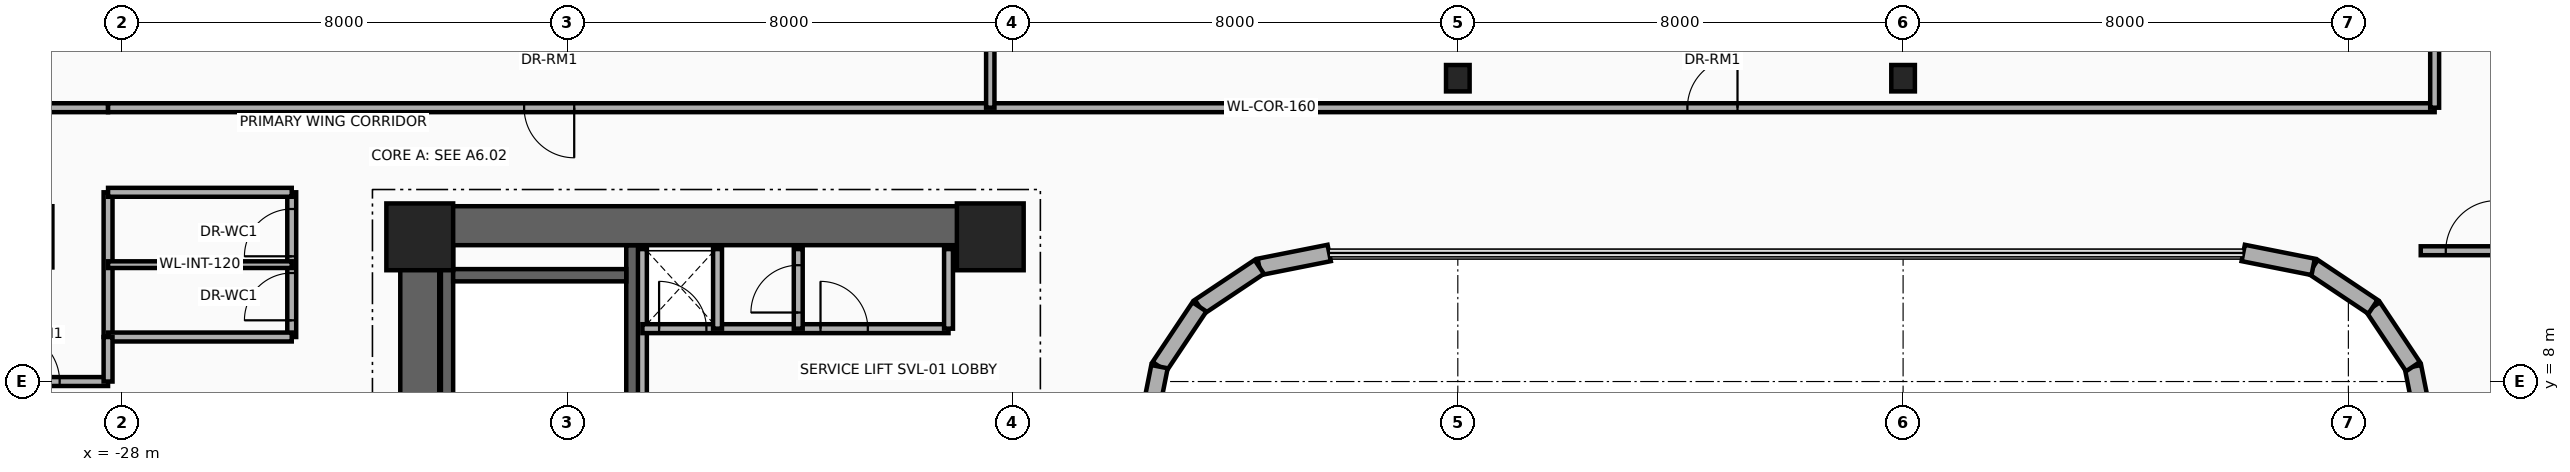
"""IFC4 building model, lengths in metres.
Left out: names, types, materials, properties, quantities, classifications, styles, units other than length and angle.
Written with IfcOpenShell. Run it as: python <this file> out.ifc"""

import sys

from ifc_helpers import new_model, si_unit, direction, frame, frame_2d, origin, origin_2d, place, context, subcontext, project, spatial, rectangle, i_section, extrude, source, transform, mapped, element, fill, save


model = new_model("IFC4")
c1 = context("Model", 3, precision=1e-05, world=origin(), true_north=direction((0.0, 1.0)))
c2 = subcontext(c1, "Body", "Model", "MODEL_VIEW")
j1 = project(units=[si_unit("LENGTHUNIT", "METRE"), si_unit("PLANEANGLEUNIT", "RADIAN")], contexts=[c1])
p1 = place(None, origin())
s1 = spatial("IfcSite", under=j1, at=p1, CompositionType="ELEMENT")
p2 = place(p1, origin())
s2 = spatial("IfcBuilding", under=s1, at=p2, CompositionType="ELEMENT")
p3 = place(p2, frame((0.0, 0.0, 120.5)))
s3 = spatial("IfcBuildingStorey", under=s2, at=p3, CompositionType="ELEMENT", Elevation=120.5)
for number, where, z_axis, x_axis in (
    (1, (-22.16, 1.78, 0.0), (0.0, 0.0, 1.0), (0.0, 1.0, 0.0)),
    (2, (-18.83, 1.78, 0.0), (0.0, 0.0, 1.0), (0.0, 1.0, 0.0)),
):
    element("IfcWall", number, at=place(p3, frame(where, z_axis=z_axis, x_axis=x_axis)), inside=s3, PredefinedType="SHEAR", context=c2, shape_type="SweptSolid", body=[
        extrude(rectangle(XDim=8.67, YDim=0.22, at=frame_2d((4.335, 0.0))), origin(), (0.0, 0.0, 1.0), 3.46),
    ])
p4 = place(p3, frame((-22.05, 9.91, 0.0), z_axis=(0.0, 0.0, 1.0), x_axis=(1.0, 0.0, 0.0)))
e3 = element("IfcWall", 3, at=p4, inside=s3, PredefinedType="SHEAR", context=c2, shape_type="SweptSolid", body=[
    extrude(rectangle(XDim=3.11, YDim=0.22, at=frame_2d((1.555, 0.0))), origin(), (0.0, 0.0, 1.0), 3.46),
])
p5 = place(p3, frame((-22.65, -11.15, 0.0), z_axis=(0.0, 0.0, 1.0), x_axis=(0.0, 1.0, 0.0)))
e4 = element("IfcWall", 4, at=p5, inside=s3, PredefinedType="SHEAR", context=c2, shape_type="SweptSolid", body=[
    extrude(rectangle(XDim=22.3, YDim=0.7, at=frame_2d((11.15, 0.0))), origin(), (0.0, 0.0, 1.0), 3.46),
])
p6 = place(p3, frame((-22.65, 10.8, 0.0), z_axis=(0.0, 0.0, 1.0), x_axis=(1.0, 0.0, 0.0)))
e5 = element("IfcWall", 5, at=p6, inside=s3, PredefinedType="SHEAR", context=c2, shape_type="SweptSolid", body=[
    extrude(rectangle(XDim=10.25, YDim=0.7, at=frame_2d((5.125, 0.0))), origin(), (0.0, 0.0, 1.0), 3.46),
])
m1 = source(origin(), c2, "Body", "SweptSolid", [
    extrude(rectangle(XDim=1.2, YDim=1.2, at=origin_2d()), origin(), (0.0, 0.0, 1.0), 3.7),
])
for number, where, z_axis, x_axis in (
    (6, (-22.65, 10.6, 0.0), (0.0, 0.0, 1.0), (1.0, 0.0, 0.0)),
    (7, (-12.4, 10.6, 0.0), (0.0, 0.0, 1.0), (1.0, 0.0, 0.0)),
):
    element("IfcColumn", number, at=place(p3, frame(where, z_axis=z_axis, x_axis=x_axis)), inside=s3, PredefinedType="COLUMN", context=c2, shape_type="MappedRepresentation", body=[
        mapped(m1, transform((0.0, 0.0, 0.0), x_axis=(1.0, 0.0, 0.0), y_axis=(0.0, 1.0, 0.0), z_axis=(0.0, 0.0, 1.0), scale=1.0)),
    ])
m2 = source(origin(), c2, "Body", "SweptSolid", [
    extrude(i_section(OverallWidth=0.424, OverallDepth=0.474, WebThickness=0.048, FlangeThickness=0.077, at=origin_2d()), origin(), (0.0, 0.0, 1.0), 3.7),
])
for number, where, z_axis, x_axis in (
    (8, (-4.0, 13.45, 0.0), (0.0, 0.0, 1.0), (1.0, 0.0, 0.0)),
    (9, (4.0, 13.45, 0.0), (0.0, 0.0, 1.0), (1.0, 0.0, 0.0)),
):
    element("IfcColumn", number, at=place(p3, frame(where, z_axis=z_axis, x_axis=x_axis)), inside=s3, PredefinedType="COLUMN", context=c2, shape_type="MappedRepresentation", body=[
        mapped(m2, transform((0.0, 0.0, 0.0), x_axis=(1.0, 0.0, 0.0), y_axis=(0.0, 1.0, 0.0), z_axis=(0.0, 0.0, 1.0), scale=1.0)),
    ])
p7 = place(p3, frame((13.41, 7.011, 0.0), z_axis=(0.0, 0.0, 1.0), x_axis=(-0.195090163074, 0.980785312019, 0.0)))
e10 = element("IfcWall", 10, at=p7, inside=s3, PredefinedType="SOLIDWALL", context=c2, shape_type="SweptSolid", body=[
    extrude(rectangle(XDim=1.281, YDim=0.3, at=frame_2d((0.641, 0.0))), origin(), (0.0, 0.0, 1.0), 3.46),
])
for number, where, z_axis, x_axis in (
    (11, (13.16, 8.268, 0.0), (0.0, 0.0, 1.0), (-0.556, 0.831, 0.0)),
    (12, (12.442, 9.342, 0.0), (0.0, 0.0, 1.0), (-0.831, 0.556, 0.0)),
):
    element("IfcWall", number, at=place(p3, frame(where, z_axis=z_axis, x_axis=x_axis)), inside=s3, PredefinedType="SOLIDWALL", context=c2, shape_type="SweptSolid", body=[
        extrude(rectangle(XDim=1.292, YDim=0.3, at=frame_2d((0.646, 0.0))), origin(), (0.0, 0.0, 1.0), 3.46),
    ])
for number, where, z_axis, x_axis in (
    (13, (11.367, 10.06, 0.0), (0.0, 0.0, 1.0), (-0.981, 0.195, 0.0)),
    (14, (-6.311, 10.31, 0.0), (0.0, 0.0, 1.0), (-0.981, -0.195, 0.0)),
):
    element("IfcWall", number, at=place(p3, frame(where, z_axis=z_axis, x_axis=x_axis)), inside=s3, PredefinedType="SOLIDWALL", context=c2, shape_type="SweptSolid", body=[
        extrude(rectangle(XDim=1.281, YDim=0.3, at=frame_2d((0.641, 0.0))), origin(), (0.0, 0.0, 1.0), 3.46),
    ])
p8 = place(p3, frame((-7.567, 10.06, 0.0), z_axis=(0.0, 0.0, 1.0), x_axis=(-0.831497739511, -0.555528135371, 0.0)))
e15 = element("IfcWall", 15, at=p8, inside=s3, PredefinedType="SOLIDWALL", context=c2, shape_type="SweptSolid", body=[
    extrude(rectangle(XDim=1.292, YDim=0.3, at=frame_2d((0.646, 0.0))), origin(), (0.0, 0.0, 1.0), 3.46),
])
p9 = place(p3, frame((-8.642, 9.342, 0.0), z_axis=(0.0, 0.0, 1.0), x_axis=(-0.555615398575, -0.831439431869, 0.0)))
e16 = element("IfcWall", 16, at=p9, inside=s3, PredefinedType="SOLIDWALL", context=c2, shape_type="SweptSolid", body=[
    extrude(rectangle(XDim=1.292, YDim=0.3, at=frame_2d((0.646, 0.0))), origin(), (0.0, 0.0, 1.0), 3.46),
])
p10 = place(p3, frame((-9.36, 8.268, 0.0), z_axis=(0.0, 0.0, 1.0), x_axis=(-0.195090163074, -0.980785312019, 0.0)))
e17 = element("IfcWall", 17, at=p10, inside=s3, PredefinedType="SOLIDWALL", context=c2, shape_type="SweptSolid", body=[
    extrude(rectangle(XDim=1.281, YDim=0.3, at=frame_2d((0.641, 0.0))), origin(), (0.0, 0.0, 1.0), 3.46),
])
p11 = place(p3, frame((-18.65, 7.45, 0.0), z_axis=(0.0, 0.0, 1.0), x_axis=(0.0, 1.0, 0.0)))
e18 = element("IfcWall", 18, at=p11, inside=s3, PredefinedType="PARTITIONING", context=c2, shape_type="SweptSolid", body=[
    extrude(rectangle(XDim=2.93, YDim=0.16, at=frame_2d((1.465, 0.0))), origin(), (0.0, 0.0, 1.0), 3.46),
])
p12 = place(p3, frame((-18.65, 8.95, 0.0), z_axis=(0.0, 0.0, 1.0), x_axis=(1.0, 0.0, 0.0)))
e19 = element("IfcWall", 19, at=p12, inside=s3, PredefinedType="PARTITIONING", context=c2, shape_type="SweptSolid", body=[
    extrude(rectangle(XDim=5.5, YDim=0.16, at=frame_2d((2.75, 0.0))), origin(), (0.0, 0.0, 1.0), 3.46),
])
p13 = place(p12, frame((0.3, 0.0, 0.0)))
e20 = element("IfcOpeningElement", 20, at=p13, cuts=e19, PredefinedType="OPENING", context=c2, shape_type="SweptSolid", body=[
    extrude(rectangle(XDim=0.85, YDim=2.05, at=frame_2d((0.425, 1.025))), frame((0.0, 0.095, 0.0), z_axis=(0.0, -1.0, 0.0), x_axis=(1.0, 0.0, 0.0)), (0.0, 0.0, 1.0), 0.19),
])
p14 = place(p12, frame((3.2, 0.0, 0.0)))
e21 = element("IfcOpeningElement", 21, at=p14, cuts=e19, PredefinedType="OPENING", context=c2, shape_type="SweptSolid", body=[
    extrude(rectangle(XDim=0.85, YDim=2.05, at=frame_2d((0.425, 1.025))), frame((0.0, 0.095, 0.0), z_axis=(0.0, -1.0, 0.0), x_axis=(1.0, 0.0, 0.0)), (0.0, 0.0, 1.0), 0.19),
])
for number, where, z_axis, x_axis in (
    (22, (-13.15, 8.95, 0.0), (0.0, 0.0, 1.0), (0.0, 1.0, 0.0)),
    (23, (-17.3, 8.95, 0.0), (0.0, 0.0, 1.0), (0.0, 1.0, 0.0)),
):
    element("IfcWall", number, at=place(p3, frame(where, z_axis=z_axis, x_axis=x_axis)), inside=s3, PredefinedType="PARTITIONING", context=c2, shape_type="SweptSolid", body=[
        extrude(rectangle(XDim=1.43, YDim=0.16, at=frame_2d((0.715, 0.0))), origin(), (0.0, 0.0, 1.0), 3.46),
    ])
p15 = place(p3, frame((-15.85, 8.95, 0.0), z_axis=(0.0, 0.0, 1.0), x_axis=(0.0, 1.0, 0.0)))
e24 = element("IfcWall", 24, at=p15, inside=s3, PredefinedType="PARTITIONING", context=c2, shape_type="SweptSolid", body=[
    extrude(rectangle(XDim=1.43, YDim=0.16, at=frame_2d((0.715, 0.0))), origin(), (0.0, 0.0, 1.0), 3.46),
])
p16 = place(p15, frame((0.29, 0.0, 0.0)))
e25 = element("IfcOpeningElement", 25, at=p16, cuts=e24, PredefinedType="OPENING", context=c2, shape_type="SweptSolid", body=[
    extrude(rectangle(XDim=0.85, YDim=2.05, at=frame_2d((0.425, 1.025))), frame((0.0, 0.095, 0.0), z_axis=(0.0, -1.0, 0.0), x_axis=(1.0, 0.0, 0.0)), (0.0, 0.0, 1.0), 0.19),
])
p17 = place(p3, frame((-28.25, 8.8, 0.0), z_axis=(0.0, 0.0, 1.0), x_axis=(0.0, 1.0, 0.0)))
e26 = element("IfcWall", 26, at=p17, inside=s3, PredefinedType="PARTITIONING", context=c2, shape_type="SweptSolid", body=[
    extrude(rectangle(XDim=2.6, YDim=0.16, at=frame_2d((1.3, 0.0))), origin(), (0.0, 0.0, 1.0), 2.666),
])
p18 = place(p3, frame((-24.95, 8.8, 0.0), z_axis=(0.0, 0.0, 1.0), x_axis=(0.0, 1.0, 0.0)))
e27 = element("IfcWall", 27, at=p18, inside=s3, PredefinedType="PARTITIONING", context=c2, shape_type="SweptSolid", body=[
    extrude(rectangle(XDim=2.6, YDim=0.16, at=frame_2d((1.3, 0.0))), origin(), (0.0, 0.0, 1.0), 2.666),
])
p19 = place(p18, frame((0.3, 0.0, 0.0)))
e28 = element("IfcOpeningElement", 28, at=p19, cuts=e27, PredefinedType="OPENING", context=c2, shape_type="SweptSolid", body=[
    extrude(rectangle(XDim=0.85, YDim=2.1, at=frame_2d((0.425, 1.05))), frame((0.0, 0.095, 0.0), z_axis=(0.0, -1.0, 0.0), x_axis=(1.0, 0.0, 0.0)), (0.0, 0.0, 1.0), 0.19),
])
p20 = place(p18, frame((1.45, 0.0, 0.0)))
e29 = element("IfcOpeningElement", 29, at=p20, cuts=e27, PredefinedType="OPENING", context=c2, shape_type="SweptSolid", body=[
    extrude(rectangle(XDim=0.85, YDim=2.1, at=frame_2d((0.425, 1.05))), frame((0.0, 0.095, 0.0), z_axis=(0.0, -1.0, 0.0), x_axis=(1.0, 0.0, 0.0)), (0.0, 0.0, 1.0), 0.19),
])
for number, where, z_axis, x_axis in (
    (30, (-28.25, 8.8, 0.0), (0.0, 0.0, 1.0), (1.0, 0.0, 0.0)),
    (31, (-28.25, 11.4, 0.0), (0.0, 0.0, 1.0), (1.0, 0.0, 0.0)),
):
    element("IfcWall", number, at=place(p3, frame(where, z_axis=z_axis, x_axis=x_axis)), inside=s3, PredefinedType="PARTITIONING", context=c2, shape_type="SweptSolid", body=[
        extrude(rectangle(XDim=3.3, YDim=0.16, at=frame_2d((1.65, 0.0))), origin(), (0.0, 0.0, 1.0), 3.46),
    ])
p21 = place(p3, frame((-28.25, 10.1, 0.0), z_axis=(0.0, 0.0, 1.0), x_axis=(1.0, 0.0, 0.0)))
e32 = element("IfcWall", 32, at=p21, inside=s3, PredefinedType="PARTITIONING", context=c2, shape_type="SweptSolid", body=[
    extrude(rectangle(XDim=3.3, YDim=0.12, at=frame_2d((1.65, 0.0))), origin(), (0.0, 0.0, 1.0), 3.46),
])
p22 = place(p3, frame((-30.89, 8.0, 0.0), z_axis=(0.0, 0.0, 1.0), x_axis=(1.0, 0.0, 0.0)))
e33 = element("IfcWall", 33, at=p22, inside=s3, PredefinedType="PARTITIONING", context=c2, shape_type="SweptSolid", body=[
    extrude(rectangle(XDim=2.64, YDim=0.16, at=frame_2d((1.32, 0.0))), origin(), (0.0, 0.0, 1.0), 2.896),
])
p23 = place(p22, frame((0.87, 0.0, 0.0)))
e34 = element("IfcOpeningElement", 34, at=p23, cuts=e33, PredefinedType="OPENING", context=c2, shape_type="SweptSolid", body=[
    extrude(rectangle(XDim=0.9, YDim=2.1, at=frame_2d((0.45, 1.05))), frame((0.0, 0.095, 0.0), z_axis=(0.0, -1.0, 0.0), x_axis=(1.0, 0.0, 0.0)), (0.0, 0.0, 1.0), 0.19),
])
p24 = place(p3, frame((-28.25, 8.0, 0.0), z_axis=(0.0, 0.0, 1.0), x_axis=(0.0, 1.0, 0.0)))
e35 = element("IfcWall", 35, at=p24, inside=s3, PredefinedType="PARTITIONING", context=c2, shape_type="SweptSolid", body=[
    extrude(rectangle(XDim=0.8, YDim=0.16, at=frame_2d((0.4, 0.0))), origin(), (0.0, 0.0, 1.0), 2.988),
])
p25 = place(p3, frame((-32.54, 12.92, 0.0), z_axis=(0.0, 0.0, 1.0), x_axis=(1.0, 0.0, 0.0)))
e36 = element("IfcWall", 36, at=p25, inside=s3, PredefinedType="PARTITIONING", context=c2, shape_type="SweptSolid", body=[
    extrude(rectangle(XDim=4.29, YDim=0.16, at=frame_2d((2.145, 0.0))), origin(), (0.0, 0.0, 1.0), 2.896),
])
p26 = place(p3, frame((-28.25, 12.92, 0.0), z_axis=(0.0, 0.0, 1.0), x_axis=(1.0, 0.0, 0.0)))
e37 = element("IfcWall", 37, at=p26, inside=s3, PredefinedType="PARTITIONING", context=c2, shape_type="SweptSolid", body=[
    extrude(rectangle(XDim=41.8, YDim=0.16, at=frame_2d((20.9, 0.0))), origin(), (0.0, 0.0, 1.0), 2.666),
])
p27 = place(p26, frame((7.475, 0.0, 0.0)))
e38 = element("IfcOpeningElement", 38, at=p27, cuts=e37, PredefinedType="OPENING", context=c2, shape_type="SweptSolid", body=[
    extrude(rectangle(XDim=0.9, YDim=2.1, at=frame_2d((0.45, 1.05))), frame((0.0, 0.095, 0.0), z_axis=(0.0, -1.0, 0.0), x_axis=(1.0, 0.0, 0.0)), (0.0, 0.0, 1.0), 0.19),
])
p28 = place(p26, frame((28.375, 0.0, 0.0)))
e39 = element("IfcOpeningElement", 39, at=p28, cuts=e37, PredefinedType="OPENING", context=c2, shape_type="SweptSolid", body=[
    extrude(rectangle(XDim=0.9, YDim=2.1, at=frame_2d((0.45, 1.05))), frame((0.0, 0.095, 0.0), z_axis=(0.0, -1.0, 0.0), x_axis=(1.0, 0.0, 0.0)), (0.0, 0.0, 1.0), 0.19),
])
p29 = place(p3, frame((13.55, 12.92, 0.0), z_axis=(0.0, 0.0, 1.0), x_axis=(0.0, 1.0, 0.0)))
e40 = element("IfcWall", 40, at=p29, inside=s3, PredefinedType="PARTITIONING", context=c2, shape_type="SweptSolid", body=[
    extrude(rectangle(XDim=5.857, YDim=0.16, at=frame_2d((2.928, 0.0))), origin(), (0.0, 0.0, 1.0), 2.666),
])
p30 = place(p3, frame((-12.4, 12.92, 0.0), z_axis=(0.0, 0.0, 1.0), x_axis=(0.0, 1.0, 0.0)))
e41 = element("IfcWall", 41, at=p30, inside=s3, PredefinedType="PARTITIONING", context=c2, shape_type="SweptSolid", body=[
    extrude(rectangle(XDim=7.351, YDim=0.15, at=frame_2d((3.675, 0.0))), origin(), (0.0, 0.0, 1.0), 2.666),
])
p31 = place(p3, frame((13.3, 10.35, 0.0), z_axis=(0.0, 0.0, 1.0), x_axis=(1.0, 0.0, 0.0)))
e42 = element("IfcWall", 42, at=p31, inside=s3, PredefinedType="PARTITIONING", context=c2, shape_type="SweptSolid", body=[
    extrude(rectangle(XDim=2.1, YDim=0.16, at=frame_2d((1.05, 0.0))), origin(), (0.0, 0.0, 1.0), 2.666),
])
p32 = place(p31, frame((0.45, 0.0, 0.0)))
e43 = element("IfcOpeningElement", 43, at=p32, cuts=e42, PredefinedType="OPENING", context=c2, shape_type="SweptSolid", body=[
    extrude(rectangle(XDim=0.9, YDim=2.1, at=frame_2d((0.45, 1.05))), frame((0.0, 0.095, 0.0), z_axis=(0.0, -1.0, 0.0), x_axis=(1.0, 0.0, 0.0)), (0.0, 0.0, 1.0), 0.19),
])
p33 = place(p13, origin())
e44 = element("IfcDoor", 44, at=p33, inside=s3, OperationType="SINGLE_SWING_LEFT", PredefinedType="DOOR", context=c2, shape_type="SweptSolid", body=[
    extrude(rectangle(XDim=0.85, YDim=2.05, at=frame_2d((0.425, 1.025))), frame((0.0, 0.025, 0.0), z_axis=(0.0, -1.0, 0.0), x_axis=(1.0, 0.0, 0.0)), (0.0, 0.0, 1.0), 0.05),
])
fill(e20, e44)
p34 = place(p14, origin())
e45 = element("IfcDoor", 45, at=p34, inside=s3, OperationType="SINGLE_SWING_RIGHT", PredefinedType="DOOR", context=c2, shape_type="SweptSolid", body=[
    extrude(rectangle(XDim=0.85, YDim=2.05, at=frame_2d((0.425, 1.025))), frame((0.0, 0.025, 0.0), z_axis=(0.0, -1.0, 0.0), x_axis=(1.0, 0.0, 0.0)), (0.0, 0.0, 1.0), 0.05),
])
fill(e21, e45)
p35 = place(p16, origin())
e46 = element("IfcDoor", 46, at=p35, inside=s3, OperationType="SINGLE_SWING_LEFT", PredefinedType="DOOR", context=c2, shape_type="SweptSolid", body=[
    extrude(rectangle(XDim=0.85, YDim=2.05, at=frame_2d((0.425, 1.025))), frame((0.0, 0.025, 0.0), z_axis=(0.0, -1.0, 0.0), x_axis=(1.0, 0.0, 0.0)), (0.0, 0.0, 1.0), 0.05),
])
fill(e25, e46)
p36 = place(p19, origin())
e47 = element("IfcDoor", 47, at=p36, inside=s3, OperationType="SINGLE_SWING_LEFT", PredefinedType="DOOR", context=c2, shape_type="SweptSolid", body=[
    extrude(rectangle(XDim=0.85, YDim=2.1, at=frame_2d((0.425, 1.05))), frame((0.0, 0.025, 0.0), z_axis=(0.0, -1.0, 0.0), x_axis=(1.0, 0.0, 0.0)), (0.0, 0.0, 1.0), 0.05),
])
fill(e28, e47)
p37 = place(p20, origin())
e48 = element("IfcDoor", 48, at=p37, inside=s3, OperationType="SINGLE_SWING_RIGHT", PredefinedType="DOOR", context=c2, shape_type="SweptSolid", body=[
    extrude(rectangle(XDim=0.85, YDim=2.1, at=frame_2d((0.425, 1.05))), frame((0.0, 0.025, 0.0), z_axis=(0.0, -1.0, 0.0), x_axis=(1.0, 0.0, 0.0)), (0.0, 0.0, 1.0), 0.05),
])
fill(e29, e48)
p38 = place(p23, origin())
e49 = element("IfcDoor", 49, at=p38, inside=s3, OperationType="SINGLE_SWING_RIGHT", PredefinedType="DOOR", context=c2, shape_type="SweptSolid", body=[
    extrude(rectangle(XDim=0.9, YDim=2.1, at=frame_2d((0.45, 1.05))), frame((0.0, 0.025, 0.0), z_axis=(0.0, -1.0, 0.0), x_axis=(1.0, 0.0, 0.0)), (0.0, 0.0, 1.0), 0.05),
])
fill(e34, e49)
p39 = place(p27, frame((0.9, 0.0, 0.0), z_axis=(0.0, 0.0, 1.0), x_axis=(-1.0, 0.0, 0.0)))
e50 = element("IfcDoor", 50, at=p39, inside=s3, OperationType="SINGLE_SWING_LEFT", PredefinedType="DOOR", context=c2, shape_type="SweptSolid", body=[
    extrude(rectangle(XDim=0.9, YDim=2.1, at=frame_2d((0.45, 1.05))), frame((0.0, 0.025, 0.0), z_axis=(0.0, -1.0, 0.0), x_axis=(1.0, 0.0, 0.0)), (0.0, 0.0, 1.0), 0.05),
])
fill(e38, e50)
p40 = place(p28, origin())
e51 = element("IfcDoor", 51, at=p40, inside=s3, OperationType="SINGLE_SWING_RIGHT", PredefinedType="DOOR", context=c2, shape_type="SweptSolid", body=[
    extrude(rectangle(XDim=0.9, YDim=2.1, at=frame_2d((0.45, 1.05))), frame((0.0, 0.025, 0.0), z_axis=(0.0, -1.0, 0.0), x_axis=(1.0, 0.0, 0.0)), (0.0, 0.0, 1.0), 0.05),
])
fill(e39, e51)
p41 = place(p32, origin())
e52 = element("IfcDoor", 52, at=p41, inside=s3, OperationType="SINGLE_SWING_LEFT", PredefinedType="DOOR", context=c2, shape_type="SweptSolid", body=[
    extrude(rectangle(XDim=0.9, YDim=2.1, at=frame_2d((0.45, 1.05))), frame((0.0, 0.025, 0.0), z_axis=(0.0, -1.0, 0.0), x_axis=(1.0, 0.0, 0.0)), (0.0, 0.0, 1.0), 0.05),
])
fill(e43, e52)
save(model, sys.argv[1])
